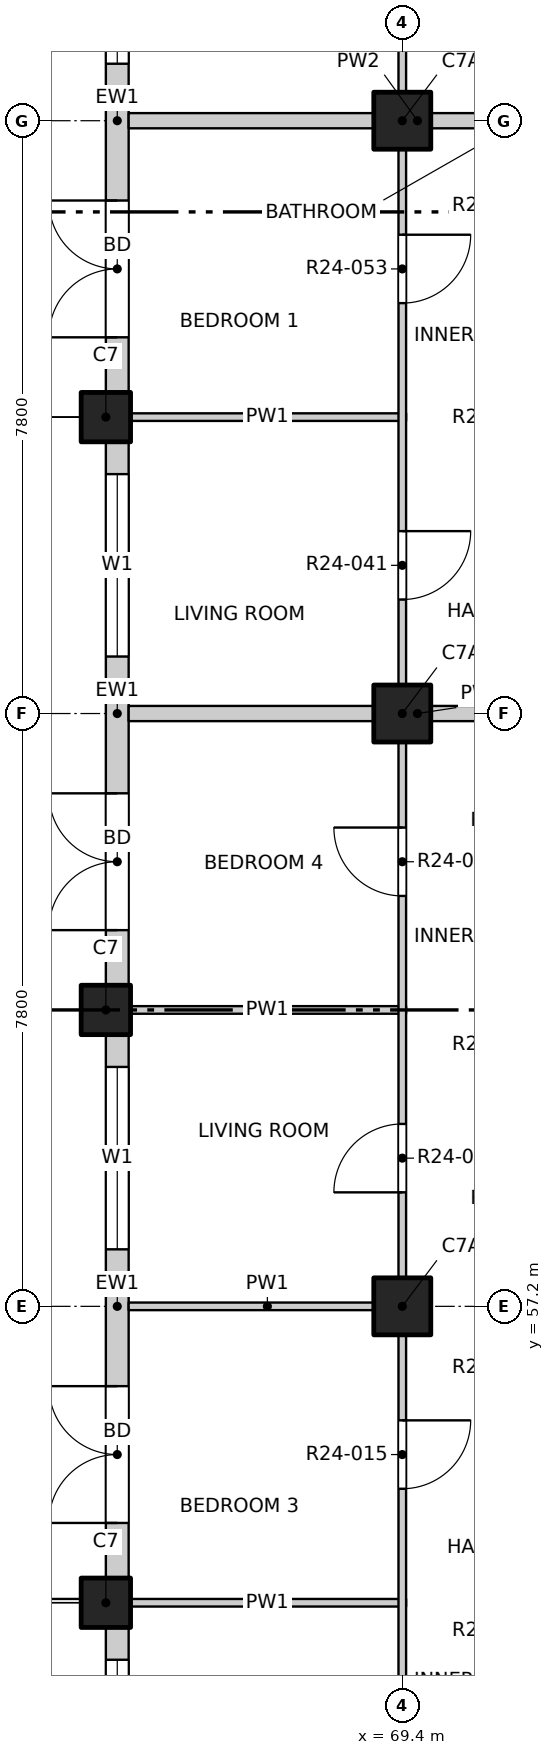
"""IFC4 building model, lengths in metres.
Left out: names, types, materials, properties, quantities, classifications, styles, units other than length and angle.
Written with IfcOpenShell. Run it as: python <this file> out.ifc"""

import sys

from ifc_helpers import new_model, si_unit, direction, frame, frame_2d, origin, origin_2d, place, context, subcontext, project, spatial, rectangle, extrude, element, fill, save


model = new_model("IFC4")
c1 = context("Model", 3, precision=1e-05, world=origin(), true_north=direction((0.0, 1.0)))
c2 = subcontext(c1, "Body", "Model", "MODEL_VIEW")
j1 = project(units=[si_unit("LENGTHUNIT", "METRE"), si_unit("PLANEANGLEUNIT", "RADIAN")], contexts=[c1])
p1 = place(None, origin())
s1 = spatial("IfcSite", under=j1, at=p1, CompositionType="ELEMENT")
p2 = place(p1, origin())
s2 = spatial("IfcBuilding", under=s1, at=p2, CompositionType="ELEMENT")
p3 = place(p2, frame((0.0, 0.0, 246.0)))
s3 = spatial("IfcBuildingStorey", under=s2, at=p3, CompositionType="ELEMENT", Elevation=246.0)
for number, where, z_axis, x_axis in (
    (1, (65.5, 53.3, -0.3), (0.0, 0.0, 1.0), (1.0, 0.0, 0.0)),
    (2, (65.5, 61.1, -0.3), (0.0, 0.0, 1.0), (1.0, 0.0, 0.0)),
    (3, (65.5, 68.9, -0.3), (0.0, 0.0, 1.0), (1.0, 0.0, 0.0)),
):
    element("IfcColumn", number, at=place(p3, frame(where, z_axis=z_axis, x_axis=x_axis)), inside=s3, PredefinedType="COLUMN", context=c2, shape_type="SweptSolid", body=[
        extrude(rectangle(XDim=0.65, YDim=0.65, at=origin_2d()), origin(), (0.0, 0.0, 1.0), 3.45),
    ])
for number, where, z_axis, x_axis in (
    (4, (69.4, 57.2, -0.3), (0.0, 0.0, 1.0), (1.0, 0.0, 0.0)),
    (5, (69.4, 65.0, -0.3), (0.0, 0.0, 1.0), (1.0, 0.0, 0.0)),
    (6, (69.4, 72.8, -0.3), (0.0, 0.0, 1.0), (1.0, 0.0, 0.0)),
):
    element("IfcColumn", number, at=place(p3, frame(where, z_axis=z_axis, x_axis=x_axis)), inside=s3, PredefinedType="COLUMN", context=c2, shape_type="SweptSolid", body=[
        extrude(rectangle(XDim=0.75, YDim=0.75, at=origin_2d()), origin(), (0.0, 0.0, 1.0), 3.45),
    ])
p4 = place(p3, frame((65.65, 49.4, 0.0), z_axis=(0.0, 0.0, 1.0), x_axis=(0.0, 1.0, 0.0)))
e7 = element("IfcWall", 7, at=p4, inside=s3, PredefinedType="SOLIDWALL", context=c2, shape_type="SweptSolid", body=[
    extrude(rectangle(XDim=3.575, YDim=0.3, at=frame_2d((1.788, 0.0))), origin(), (0.0, 0.0, 1.0), 2.7),
])
p5 = place(p4, frame((0.75, 0.0, 0.9)))
e8 = element("IfcOpeningElement", 8, at=p5, cuts=e7, PredefinedType="OPENING", context=c2, shape_type="SweptSolid", body=[
    extrude(rectangle(XDim=2.4, YDim=1.8, at=frame_2d((1.2, 0.9))), frame((0.0, 0.16, 0.0), z_axis=(0.0, -1.0, 0.0), x_axis=(1.0, 0.0, 0.0)), (0.0, 0.0, 1.0), 0.32),
])
p6 = place(p3, frame((65.65, 53.625, 0.0), z_axis=(0.0, 0.0, 1.0), x_axis=(0.0, 1.0, 0.0)))
e9 = element("IfcWall", 9, at=p6, inside=s3, PredefinedType="SOLIDWALL", context=c2, shape_type="SweptSolid", body=[
    extrude(rectangle(XDim=7.15, YDim=0.3, at=frame_2d((3.575, 0.0))), origin(), (0.0, 0.0, 1.0), 2.7),
])
p7 = place(p6, frame((0.725, 0.0, 0.0)))
e10 = element("IfcOpeningElement", 10, at=p7, cuts=e9, PredefinedType="OPENING", context=c2, shape_type="SweptSolid", body=[
    extrude(rectangle(XDim=1.8, YDim=2.4, at=frame_2d((0.9, 1.2))), frame((0.0, 0.16, 0.0), z_axis=(0.0, -1.0, 0.0), x_axis=(1.0, 0.0, 0.0)), (0.0, 0.0, 1.0), 0.32),
])
p8 = place(p6, frame((4.325, 0.0, 0.9)))
e11 = element("IfcOpeningElement", 11, at=p8, cuts=e9, PredefinedType="OPENING", context=c2, shape_type="SweptSolid", body=[
    extrude(rectangle(XDim=2.4, YDim=1.8, at=frame_2d((1.2, 0.9))), frame((0.0, 0.16, 0.0), z_axis=(0.0, -1.0, 0.0), x_axis=(1.0, 0.0, 0.0)), (0.0, 0.0, 1.0), 0.32),
])
p9 = place(p3, frame((65.65, 61.425, 0.0), z_axis=(0.0, 0.0, 1.0), x_axis=(0.0, 1.0, 0.0)))
e12 = element("IfcWall", 12, at=p9, inside=s3, PredefinedType="SOLIDWALL", context=c2, shape_type="SweptSolid", body=[
    extrude(rectangle(XDim=7.15, YDim=0.3, at=frame_2d((3.575, 0.0))), origin(), (0.0, 0.0, 1.0), 2.7),
])
p10 = place(p9, frame((0.725, 0.0, 0.0)))
e13 = element("IfcOpeningElement", 13, at=p10, cuts=e12, PredefinedType="OPENING", context=c2, shape_type="SweptSolid", body=[
    extrude(rectangle(XDim=1.8, YDim=2.4, at=frame_2d((0.9, 1.2))), frame((0.0, 0.16, 0.0), z_axis=(0.0, -1.0, 0.0), x_axis=(1.0, 0.0, 0.0)), (0.0, 0.0, 1.0), 0.32),
])
p11 = place(p9, frame((4.325, 0.0, 0.9)))
e14 = element("IfcOpeningElement", 14, at=p11, cuts=e12, PredefinedType="OPENING", context=c2, shape_type="SweptSolid", body=[
    extrude(rectangle(XDim=2.4, YDim=1.8, at=frame_2d((1.2, 0.9))), frame((0.0, 0.16, 0.0), z_axis=(0.0, -1.0, 0.0), x_axis=(1.0, 0.0, 0.0)), (0.0, 0.0, 1.0), 0.32),
])
p12 = place(p3, frame((65.65, 69.225, 0.0), z_axis=(0.0, 0.0, 1.0), x_axis=(0.0, 1.0, 0.0)))
e15 = element("IfcWall", 15, at=p12, inside=s3, PredefinedType="SOLIDWALL", context=c2, shape_type="SweptSolid", body=[
    extrude(rectangle(XDim=7.15, YDim=0.3, at=frame_2d((3.575, 0.0))), origin(), (0.0, 0.0, 1.0), 2.7),
])
p13 = place(p12, frame((0.725, 0.0, 0.0)))
e16 = element("IfcOpeningElement", 16, at=p13, cuts=e15, PredefinedType="OPENING", context=c2, shape_type="SweptSolid", body=[
    extrude(rectangle(XDim=1.8, YDim=2.4, at=frame_2d((0.9, 1.2))), frame((0.0, 0.16, 0.0), z_axis=(0.0, -1.0, 0.0), x_axis=(1.0, 0.0, 0.0)), (0.0, 0.0, 1.0), 0.32),
])
p14 = place(p12, frame((4.325, 0.0, 0.9)))
e17 = element("IfcOpeningElement", 17, at=p14, cuts=e15, PredefinedType="OPENING", context=c2, shape_type="SweptSolid", body=[
    extrude(rectangle(XDim=2.4, YDim=1.8, at=frame_2d((1.2, 0.9))), frame((0.0, 0.16, 0.0), z_axis=(0.0, -1.0, 0.0), x_axis=(1.0, 0.0, 0.0)), (0.0, 0.0, 1.0), 0.32),
])
for number, where, z_axis, x_axis in (
    (18, (65.8, 53.3, 0.0), (0.0, 0.0, 1.0), (1.0, 0.0, 0.0)),
    (19, (65.8, 57.2, 0.0), (0.0, 0.0, 1.0), (1.0, 0.0, 0.0)),
):
    element("IfcWall", number, at=place(p3, frame(where, z_axis=z_axis, x_axis=x_axis)), inside=s3, PredefinedType="PARTITIONING", context=c2, shape_type="SweptSolid", body=[
        extrude(rectangle(XDim=3.65, YDim=0.1, at=frame_2d((1.825, 0.0))), origin(), (0.0, 0.0, 1.0), 3.15),
    ])
p15 = place(p3, frame((65.8, 61.1, 0.0), z_axis=(0.0, 0.0, 1.0), x_axis=(1.0, 0.0, 0.0)))
e20 = element("IfcWall", 20, at=p15, inside=s3, PredefinedType="PARTITIONING", context=c2, shape_type="SweptSolid", body=[
    extrude(rectangle(XDim=3.65, YDim=0.1, at=frame_2d((1.825, 0.0))), origin(), (0.0, 0.0, 1.0), 2.55),
])
p16 = place(p3, frame((65.8, 65.0, 0.0), z_axis=(0.0, 0.0, 1.0), x_axis=(1.0, 0.0, 0.0)))
e21 = element("IfcWall", 21, at=p16, inside=s3, PredefinedType="PARTITIONING", context=c2, shape_type="SweptSolid", body=[
    extrude(rectangle(XDim=7.6, YDim=0.2, at=frame_2d((3.8, 0.0))), origin(), (0.0, 0.0, 1.0), 3.15),
])
p17 = place(p3, frame((65.8, 68.9, 0.0), z_axis=(0.0, 0.0, 1.0), x_axis=(1.0, 0.0, 0.0)))
e22 = element("IfcWall", 22, at=p17, inside=s3, PredefinedType="PARTITIONING", context=c2, shape_type="SweptSolid", body=[
    extrude(rectangle(XDim=3.65, YDim=0.1, at=frame_2d((1.825, 0.0))), origin(), (0.0, 0.0, 1.0), 2.55),
])
p18 = place(p3, frame((65.8, 72.8, 0.0), z_axis=(0.0, 0.0, 1.0), x_axis=(1.0, 0.0, 0.0)))
e23 = element("IfcWall", 23, at=p18, inside=s3, PredefinedType="PARTITIONING", context=c2, shape_type="SweptSolid", body=[
    extrude(rectangle(XDim=7.6, YDim=0.2, at=frame_2d((3.8, 0.0))), origin(), (0.0, 0.0, 1.0), 3.15),
])
p19 = place(p3, frame((69.4, 45.8, 0.0), z_axis=(0.0, 0.0, 1.0), x_axis=(0.0, 1.0, 0.0)))
e24 = element("IfcWall", 24, at=p19, inside=s3, PredefinedType="PARTITIONING", context=c2, shape_type="SweptSolid", body=[
    extrude(rectangle(XDim=38.4, YDim=0.1, at=frame_2d((19.2, 0.0))), origin(), (0.0, 0.0, 1.0), 3.15),
])
p20 = place(p19, frame((1.05, 0.0, 0.0)))
e25 = element("IfcOpeningElement", 25, at=p20, cuts=e24, PredefinedType="OPENING", context=c2, shape_type="SweptSolid", body=[
    extrude(rectangle(XDim=1.2, YDim=2.1, at=frame_2d((0.6, 1.05))), frame((0.0, 0.06, 0.0), z_axis=(0.0, -1.0, 0.0), x_axis=(1.0, 0.0, 0.0)), (0.0, 0.0, 1.0), 0.12),
])
p21 = place(p19, frame((5.1, 0.0, 0.0)))
e26 = element("IfcOpeningElement", 26, at=p21, cuts=e24, PredefinedType="OPENING", context=c2, shape_type="SweptSolid", body=[
    extrude(rectangle(XDim=0.9, YDim=2.1, at=frame_2d((0.45, 1.05))), frame((0.0, 0.06, 0.0), z_axis=(0.0, -1.0, 0.0), x_axis=(1.0, 0.0, 0.0)), (0.0, 0.0, 1.0), 0.12),
])
p22 = place(p19, frame((9.0, 0.0, 0.0)))
e27 = element("IfcOpeningElement", 27, at=p22, cuts=e24, PredefinedType="OPENING", context=c2, shape_type="SweptSolid", body=[
    extrude(rectangle(XDim=0.9, YDim=2.1, at=frame_2d((0.45, 1.05))), frame((0.0, 0.06, 0.0), z_axis=(0.0, -1.0, 0.0), x_axis=(1.0, 0.0, 0.0)), (0.0, 0.0, 1.0), 0.12),
])
p23 = place(p19, frame((12.9, 0.0, 0.0)))
e28 = element("IfcOpeningElement", 28, at=p23, cuts=e24, PredefinedType="OPENING", context=c2, shape_type="SweptSolid", body=[
    extrude(rectangle(XDim=0.9, YDim=2.1, at=frame_2d((0.45, 1.05))), frame((0.0, 0.06, 0.0), z_axis=(0.0, -1.0, 0.0), x_axis=(1.0, 0.0, 0.0)), (0.0, 0.0, 1.0), 0.12),
])
p24 = place(p19, frame((16.8, 0.0, 0.0)))
e29 = element("IfcOpeningElement", 29, at=p24, cuts=e24, PredefinedType="OPENING", context=c2, shape_type="SweptSolid", body=[
    extrude(rectangle(XDim=0.9, YDim=2.1, at=frame_2d((0.45, 1.05))), frame((0.0, 0.06, 0.0), z_axis=(0.0, -1.0, 0.0), x_axis=(1.0, 0.0, 0.0)), (0.0, 0.0, 1.0), 0.12),
])
p25 = place(p19, frame((20.7, 0.0, 0.0)))
e30 = element("IfcOpeningElement", 30, at=p25, cuts=e24, PredefinedType="OPENING", context=c2, shape_type="SweptSolid", body=[
    extrude(rectangle(XDim=0.9, YDim=2.1, at=frame_2d((0.45, 1.05))), frame((0.0, 0.06, 0.0), z_axis=(0.0, -1.0, 0.0), x_axis=(1.0, 0.0, 0.0)), (0.0, 0.0, 1.0), 0.12),
])
p26 = place(p19, frame((24.6, 0.0, 0.0)))
e31 = element("IfcOpeningElement", 31, at=p26, cuts=e24, PredefinedType="OPENING", context=c2, shape_type="SweptSolid", body=[
    extrude(rectangle(XDim=0.9, YDim=2.1, at=frame_2d((0.45, 1.05))), frame((0.0, 0.06, 0.0), z_axis=(0.0, -1.0, 0.0), x_axis=(1.0, 0.0, 0.0)), (0.0, 0.0, 1.0), 0.12),
])
p27 = place(p19, frame((30.3, 0.0, 0.0)))
e32 = element("IfcOpeningElement", 32, at=p27, cuts=e24, PredefinedType="OPENING", context=c2, shape_type="SweptSolid", body=[
    extrude(rectangle(XDim=1.2, YDim=2.1, at=frame_2d((0.6, 1.05))), frame((0.0, 0.06, 0.0), z_axis=(0.0, -1.0, 0.0), x_axis=(1.0, 0.0, 0.0)), (0.0, 0.0, 1.0), 0.12),
])
p28 = place(p19, frame((36.15, 0.0, 0.0)))
e33 = element("IfcOpeningElement", 33, at=p28, cuts=e24, PredefinedType="OPENING", context=c2, shape_type="SweptSolid", body=[
    extrude(rectangle(XDim=1.2, YDim=2.1, at=frame_2d((0.6, 1.05))), frame((0.0, 0.06, 0.0), z_axis=(0.0, -1.0, 0.0), x_axis=(1.0, 0.0, 0.0)), (0.0, 0.0, 1.0), 0.12),
])
p29 = place(p5, origin())
e34 = element("IfcWindow", 34, at=p29, inside=s3, PartitioningType="DOUBLE_PANEL_VERTICAL", PredefinedType="WINDOW", context=c2, shape_type="SweptSolid", body=[
    extrude(rectangle(XDim=2.4, YDim=1.8, at=frame_2d((1.2, 0.9))), frame((0.0, 0.03, 0.0), z_axis=(0.0, -1.0, 0.0), x_axis=(1.0, 0.0, 0.0)), (0.0, 0.0, 1.0), 0.06),
])
fill(e8, e34)
p30 = place(p7, origin())
e35 = element("IfcDoor", 35, at=p30, inside=s3, OperationType="DOUBLE_DOOR_SINGLE_SWING", PredefinedType="DOOR", context=c2, shape_type="SweptSolid", body=[
    extrude(rectangle(XDim=1.8, YDim=2.4, at=frame_2d((0.9, 1.2))), frame((0.0, 0.025, 0.0), z_axis=(0.0, -1.0, 0.0), x_axis=(1.0, 0.0, 0.0)), (0.0, 0.0, 1.0), 0.05),
])
fill(e10, e35)
p31 = place(p8, origin())
e36 = element("IfcWindow", 36, at=p31, inside=s3, PartitioningType="DOUBLE_PANEL_VERTICAL", PredefinedType="WINDOW", context=c2, shape_type="SweptSolid", body=[
    extrude(rectangle(XDim=2.4, YDim=1.8, at=frame_2d((1.2, 0.9))), frame((0.0, 0.03, 0.0), z_axis=(0.0, -1.0, 0.0), x_axis=(1.0, 0.0, 0.0)), (0.0, 0.0, 1.0), 0.06),
])
fill(e11, e36)
p32 = place(p10, origin())
e37 = element("IfcDoor", 37, at=p32, inside=s3, OperationType="DOUBLE_DOOR_SINGLE_SWING", PredefinedType="DOOR", context=c2, shape_type="SweptSolid", body=[
    extrude(rectangle(XDim=1.8, YDim=2.4, at=frame_2d((0.9, 1.2))), frame((0.0, 0.025, 0.0), z_axis=(0.0, -1.0, 0.0), x_axis=(1.0, 0.0, 0.0)), (0.0, 0.0, 1.0), 0.05),
])
fill(e13, e37)
p33 = place(p11, origin())
e38 = element("IfcWindow", 38, at=p33, inside=s3, PartitioningType="DOUBLE_PANEL_VERTICAL", PredefinedType="WINDOW", context=c2, shape_type="SweptSolid", body=[
    extrude(rectangle(XDim=2.4, YDim=1.8, at=frame_2d((1.2, 0.9))), frame((0.0, 0.03, 0.0), z_axis=(0.0, -1.0, 0.0), x_axis=(1.0, 0.0, 0.0)), (0.0, 0.0, 1.0), 0.06),
])
fill(e14, e38)
p34 = place(p13, origin())
e39 = element("IfcDoor", 39, at=p34, inside=s3, OperationType="DOUBLE_DOOR_SINGLE_SWING", PredefinedType="DOOR", context=c2, shape_type="SweptSolid", body=[
    extrude(rectangle(XDim=1.8, YDim=2.4, at=frame_2d((0.9, 1.2))), frame((0.0, 0.025, 0.0), z_axis=(0.0, -1.0, 0.0), x_axis=(1.0, 0.0, 0.0)), (0.0, 0.0, 1.0), 0.05),
])
fill(e16, e39)
p35 = place(p14, origin())
e40 = element("IfcWindow", 40, at=p35, inside=s3, PartitioningType="DOUBLE_PANEL_VERTICAL", PredefinedType="WINDOW", context=c2, shape_type="SweptSolid", body=[
    extrude(rectangle(XDim=2.4, YDim=1.8, at=frame_2d((1.2, 0.9))), frame((0.0, 0.03, 0.0), z_axis=(0.0, -1.0, 0.0), x_axis=(1.0, 0.0, 0.0)), (0.0, 0.0, 1.0), 0.06),
])
fill(e17, e40)
p36 = place(p22, origin())
e41 = element("IfcDoor", 41, at=p36, inside=s3, OperationType="SINGLE_SWING_LEFT", PredefinedType="DOOR", context=c2, shape_type="SweptSolid", body=[
    extrude(rectangle(XDim=0.9, YDim=2.1, at=frame_2d((0.45, 1.05))), frame((0.0, 0.025, 0.0), z_axis=(0.0, -1.0, 0.0), x_axis=(1.0, 0.0, 0.0)), (0.0, 0.0, 1.0), 0.05),
])
fill(e27, e41)
p37 = place(p23, origin())
e42 = element("IfcDoor", 42, at=p37, inside=s3, OperationType="SINGLE_SWING_LEFT", PredefinedType="DOOR", context=c2, shape_type="SweptSolid", body=[
    extrude(rectangle(XDim=0.9, YDim=2.1, at=frame_2d((0.45, 1.05))), frame((0.0, 0.025, 0.0), z_axis=(0.0, -1.0, 0.0), x_axis=(1.0, 0.0, 0.0)), (0.0, 0.0, 1.0), 0.05),
])
fill(e28, e42)
p38 = place(p24, origin())
e43 = element("IfcDoor", 43, at=p38, inside=s3, OperationType="SINGLE_SWING_RIGHT", PredefinedType="DOOR", context=c2, shape_type="SweptSolid", body=[
    extrude(rectangle(XDim=0.9, YDim=2.1, at=frame_2d((0.45, 1.05))), frame((0.0, 0.025, 0.0), z_axis=(0.0, -1.0, 0.0), x_axis=(1.0, 0.0, 0.0)), (0.0, 0.0, 1.0), 0.05),
])
fill(e29, e43)
p39 = place(p25, origin())
e44 = element("IfcDoor", 44, at=p39, inside=s3, OperationType="SINGLE_SWING_LEFT", PredefinedType="DOOR", context=c2, shape_type="SweptSolid", body=[
    extrude(rectangle(XDim=0.9, YDim=2.1, at=frame_2d((0.45, 1.05))), frame((0.0, 0.025, 0.0), z_axis=(0.0, -1.0, 0.0), x_axis=(1.0, 0.0, 0.0)), (0.0, 0.0, 1.0), 0.05),
])
fill(e30, e44)
p40 = place(p26, origin())
e45 = element("IfcDoor", 45, at=p40, inside=s3, OperationType="SINGLE_SWING_LEFT", PredefinedType="DOOR", context=c2, shape_type="SweptSolid", body=[
    extrude(rectangle(XDim=0.9, YDim=2.1, at=frame_2d((0.45, 1.05))), frame((0.0, 0.025, 0.0), z_axis=(0.0, -1.0, 0.0), x_axis=(1.0, 0.0, 0.0)), (0.0, 0.0, 1.0), 0.05),
])
fill(e31, e45)
save(model, sys.argv[1])
